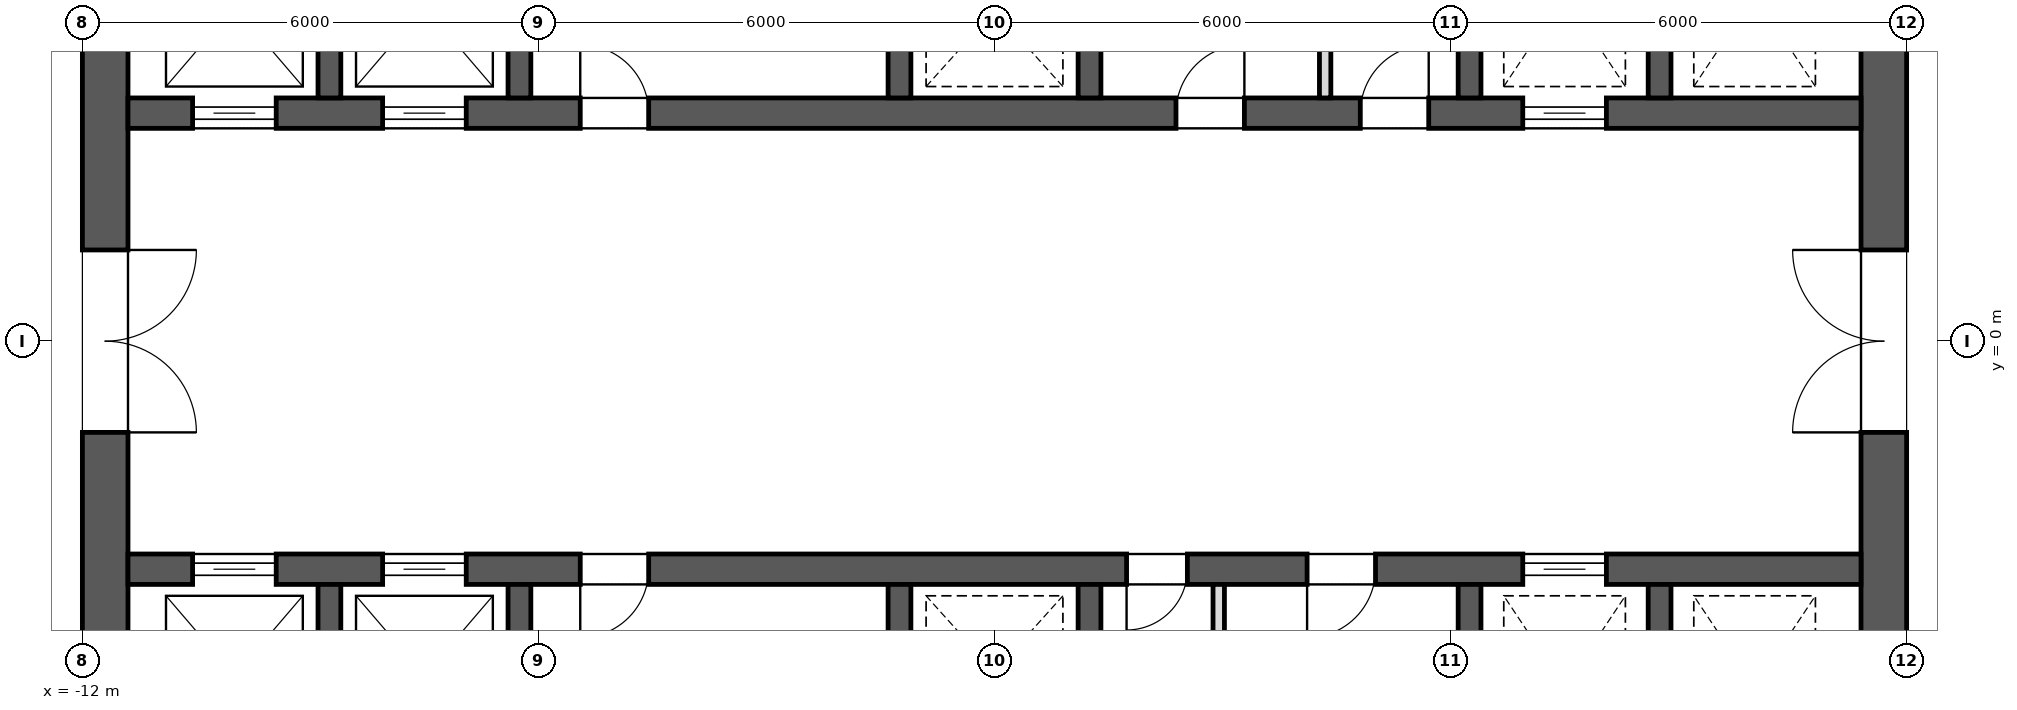
"""IFC4 building model, lengths in metres.
Left out: names, types, materials, properties, quantities, classifications, styles, units other than length and angle.
Written with IfcOpenShell. Run it as: python <this file> out.ifc"""

import sys

from ifc_helpers import new_model, si_unit, direction, frame, frame_2d, origin, place, context, subcontext, project, spatial, rectangle, extrude, element, fill, save


model = new_model("IFC4")
c1 = context("Model", 3, precision=1e-05, world=origin(), true_north=direction((0.0, 1.0)))
c2 = subcontext(c1, "Body", "Model", "MODEL_VIEW")
j1 = project(units=[si_unit("LENGTHUNIT", "METRE"), si_unit("PLANEANGLEUNIT", "RADIAN")], contexts=[c1])
p1 = place(None, origin())
s1 = spatial("IfcSite", under=j1, at=p1, CompositionType="ELEMENT")
p2 = place(p1, origin())
s2 = spatial("IfcBuilding", under=s1, at=p2, CompositionType="ELEMENT")
p3 = place(p2, frame((0.0, 0.0, 268.3)))
s3 = spatial("IfcBuildingStorey", under=s2, at=p3, CompositionType="ELEMENT", Elevation=268.3)
p4 = place(p3, frame((11.7, -11.4, 0.0), z_axis=(0.0, 0.0, 1.0), x_axis=(0.0, 1.0, 0.0)))
e1 = element("IfcWall", 1, at=p4, inside=s3, PredefinedType="SHEAR", context=c2, shape_type="SweptSolid", body=[
    extrude(rectangle(XDim=22.8, YDim=0.6, at=frame_2d((11.4, 0.0))), origin(), (0.0, 0.0, 1.0), 4.0),
])
p5 = place(p4, frame((10.2, 0.0, 0.0)))
e2 = element("IfcOpeningElement", 2, at=p5, cuts=e1, PredefinedType="OPENING", context=c2, shape_type="SweptSolid", body=[
    extrude(rectangle(XDim=2.4, YDim=2.1, at=frame_2d((1.2, 1.05))), frame((0.0, 0.312, 0.0), z_axis=(0.0, -1.0, 0.0), x_axis=(1.0, 0.0, 0.0)), (0.0, 0.0, 1.0), 0.624),
])
p6 = place(p4, frame((19.5, 0.0, 0.0)))
e3 = element("IfcOpeningElement", 3, at=p6, cuts=e1, PredefinedType="OPENING", context=c2, shape_type="SweptSolid", body=[
    extrude(rectangle(XDim=1.2, YDim=2.1, at=frame_2d((0.6, 1.05))), frame((0.0, 0.312, 0.0), z_axis=(0.0, -1.0, 0.0), x_axis=(1.0, 0.0, 0.0)), (0.0, 0.0, 1.0), 0.624),
])
p7 = place(p4, frame((2.1, 0.0, 0.0)))
e4 = element("IfcOpeningElement", 4, at=p7, cuts=e1, PredefinedType="OPENING", context=c2, shape_type="SweptSolid", body=[
    extrude(rectangle(XDim=1.2, YDim=2.1, at=frame_2d((0.6, 1.05))), frame((0.0, 0.312, 0.0), z_axis=(0.0, -1.0, 0.0), x_axis=(1.0, 0.0, 0.0)), (0.0, 0.0, 1.0), 0.624),
])
p8 = place(p3, frame((-11.7, -11.4, 0.0), z_axis=(0.0, 0.0, 1.0), x_axis=(0.0, 1.0, 0.0)))
e5 = element("IfcWall", 5, at=p8, inside=s3, PredefinedType="SHEAR", context=c2, shape_type="SweptSolid", body=[
    extrude(rectangle(XDim=22.8, YDim=0.6, at=frame_2d((11.4, 0.0))), origin(), (0.0, 0.0, 1.0), 4.0),
])
p9 = place(p8, frame((10.2, 0.0, 0.0)))
e6 = element("IfcOpeningElement", 6, at=p9, cuts=e5, PredefinedType="OPENING", context=c2, shape_type="SweptSolid", body=[
    extrude(rectangle(XDim=2.4, YDim=2.1, at=frame_2d((1.2, 1.05))), frame((0.0, 0.312, 0.0), z_axis=(0.0, -1.0, 0.0), x_axis=(1.0, 0.0, 0.0)), (0.0, 0.0, 1.0), 0.624),
])
p10 = place(p8, frame((18.925, 0.0, 0.0)))
e7 = element("IfcOpeningElement", 7, at=p10, cuts=e5, PredefinedType="OPENING", context=c2, shape_type="SweptSolid", body=[
    extrude(rectangle(XDim=1.2, YDim=2.1, at=frame_2d((0.6, 1.05))), frame((0.0, 0.312, 0.0), z_axis=(0.0, -1.0, 0.0), x_axis=(1.0, 0.0, 0.0)), (0.0, 0.0, 1.0), 0.624),
])
p11 = place(p8, frame((2.675, 0.0, 0.0)))
e8 = element("IfcOpeningElement", 8, at=p11, cuts=e5, PredefinedType="OPENING", context=c2, shape_type="SweptSolid", body=[
    extrude(rectangle(XDim=1.2, YDim=2.1, at=frame_2d((0.6, 1.05))), frame((0.0, 0.312, 0.0), z_axis=(0.0, -1.0, 0.0), x_axis=(1.0, 0.0, 0.0)), (0.0, 0.0, 1.0), 0.624),
])
p12 = place(p3, frame((-11.4, 3.0, 0.0), z_axis=(0.0, 0.0, 1.0), x_axis=(1.0, 0.0, 0.0)))
e9 = element("IfcWall", 9, at=p12, inside=s3, PredefinedType="SHEAR", context=c2, shape_type="SweptSolid", body=[
    extrude(rectangle(XDim=22.8, YDim=0.4, at=frame_2d((11.4, 0.0))), origin(), (0.0, 0.0, 1.0), 4.0),
])
p13 = place(p12, frame((0.85, 0.0, 0.0)))
e10 = element("IfcOpeningElement", 10, at=p13, cuts=e9, PredefinedType="OPENING", context=c2, shape_type="SweptSolid", body=[
    extrude(rectangle(XDim=1.1, YDim=2.1, at=frame_2d((0.55, 1.05))), frame((0.0, 0.212, 0.0), z_axis=(0.0, -1.0, 0.0), x_axis=(1.0, 0.0, 0.0)), (0.0, 0.0, 1.0), 0.424),
])
p14 = place(p12, frame((3.35, 0.0, 0.0)))
e11 = element("IfcOpeningElement", 11, at=p14, cuts=e9, PredefinedType="OPENING", context=c2, shape_type="SweptSolid", body=[
    extrude(rectangle(XDim=1.1, YDim=2.1, at=frame_2d((0.55, 1.05))), frame((0.0, 0.212, 0.0), z_axis=(0.0, -1.0, 0.0), x_axis=(1.0, 0.0, 0.0)), (0.0, 0.0, 1.0), 0.424),
])
p15 = place(p12, frame((18.35, 0.0, 0.0)))
e12 = element("IfcOpeningElement", 12, at=p15, cuts=e9, PredefinedType="OPENING", context=c2, shape_type="SweptSolid", body=[
    extrude(rectangle(XDim=1.1, YDim=2.1, at=frame_2d((0.55, 1.05))), frame((0.0, 0.212, 0.0), z_axis=(0.0, -1.0, 0.0), x_axis=(1.0, 0.0, 0.0)), (0.0, 0.0, 1.0), 0.424),
])
p16 = place(p12, frame((13.788, 0.0, 0.0)))
e13 = element("IfcOpeningElement", 13, at=p16, cuts=e9, PredefinedType="OPENING", context=c2, shape_type="SweptSolid", body=[
    extrude(rectangle(XDim=0.9, YDim=2.1, at=frame_2d((0.45, 1.05))), frame((0.0, 0.212, 0.0), z_axis=(0.0, -1.0, 0.0), x_axis=(1.0, 0.0, 0.0)), (0.0, 0.0, 1.0), 0.424),
])
p17 = place(p12, frame((16.212, 0.0, 0.0)))
e14 = element("IfcOpeningElement", 14, at=p17, cuts=e9, PredefinedType="OPENING", context=c2, shape_type="SweptSolid", body=[
    extrude(rectangle(XDim=0.9, YDim=2.1, at=frame_2d((0.45, 1.05))), frame((0.0, 0.212, 0.0), z_axis=(0.0, -1.0, 0.0), x_axis=(1.0, 0.0, 0.0)), (0.0, 0.0, 1.0), 0.424),
])
p18 = place(p12, frame((5.95, 0.0, 0.0)))
e15 = element("IfcOpeningElement", 15, at=p18, cuts=e9, PredefinedType="OPENING", context=c2, shape_type="SweptSolid", body=[
    extrude(rectangle(XDim=0.9, YDim=2.1, at=frame_2d((0.45, 1.05))), frame((0.0, 0.212, 0.0), z_axis=(0.0, -1.0, 0.0), x_axis=(1.0, 0.0, 0.0)), (0.0, 0.0, 1.0), 0.424),
])
for number, where, z_axis, x_axis in (
    (16, (-8.75, 3.2, 0.0), (0.0, 0.0, 1.0), (0.0, 1.0, 0.0)),
    (17, (-6.25, 3.2, 0.0), (0.0, 0.0, 1.0), (0.0, 1.0, 0.0)),
    (18, (-1.25, 3.2, 0.0), (0.0, 0.0, 1.0), (0.0, 1.0, 0.0)),
    (19, (1.25, 3.2, 0.0), (0.0, 0.0, 1.0), (0.0, 1.0, 0.0)),
    (20, (6.25, 3.2, 0.0), (0.0, 0.0, 1.0), (0.0, 1.0, 0.0)),
    (21, (8.75, 3.2, 0.0), (0.0, 0.0, 1.0), (0.0, 1.0, 0.0)),
):
    element("IfcWall", number, at=place(p3, frame(where, z_axis=z_axis, x_axis=x_axis)), inside=s3, PredefinedType="SHEAR", context=c2, shape_type="SweptSolid", body=[
        extrude(rectangle(XDim=2.9, YDim=0.3, at=frame_2d((1.45, 0.0))), origin(), (0.0, 0.0, 1.0), 4.0),
    ])
p19 = place(p3, frame((-11.4, -3.0, 0.0), z_axis=(0.0, 0.0, 1.0), x_axis=(1.0, 0.0, 0.0)))
e22 = element("IfcWall", 22, at=p19, inside=s3, PredefinedType="SHEAR", context=c2, shape_type="SweptSolid", body=[
    extrude(rectangle(XDim=22.8, YDim=0.4, at=frame_2d((11.4, 0.0))), origin(), (0.0, 0.0, 1.0), 4.0),
])
p20 = place(p19, frame((0.85, 0.0, 0.0)))
e23 = element("IfcOpeningElement", 23, at=p20, cuts=e22, PredefinedType="OPENING", context=c2, shape_type="SweptSolid", body=[
    extrude(rectangle(XDim=1.1, YDim=2.1, at=frame_2d((0.55, 1.05))), frame((0.0, 0.212, 0.0), z_axis=(0.0, -1.0, 0.0), x_axis=(1.0, 0.0, 0.0)), (0.0, 0.0, 1.0), 0.424),
])
p21 = place(p19, frame((3.35, 0.0, 0.0)))
e24 = element("IfcOpeningElement", 24, at=p21, cuts=e22, PredefinedType="OPENING", context=c2, shape_type="SweptSolid", body=[
    extrude(rectangle(XDim=1.1, YDim=2.1, at=frame_2d((0.55, 1.05))), frame((0.0, 0.212, 0.0), z_axis=(0.0, -1.0, 0.0), x_axis=(1.0, 0.0, 0.0)), (0.0, 0.0, 1.0), 0.424),
])
p22 = place(p19, frame((18.35, 0.0, 0.0)))
e25 = element("IfcOpeningElement", 25, at=p22, cuts=e22, PredefinedType="OPENING", context=c2, shape_type="SweptSolid", body=[
    extrude(rectangle(XDim=1.1, YDim=2.1, at=frame_2d((0.55, 1.05))), frame((0.0, 0.212, 0.0), z_axis=(0.0, -1.0, 0.0), x_axis=(1.0, 0.0, 0.0)), (0.0, 0.0, 1.0), 0.424),
])
p23 = place(p19, frame((13.137, 0.0, 0.0)))
e26 = element("IfcOpeningElement", 26, at=p23, cuts=e22, PredefinedType="OPENING", context=c2, shape_type="SweptSolid", body=[
    extrude(rectangle(XDim=0.8, YDim=2.1, at=frame_2d((0.4, 1.05))), frame((0.0, 0.212, 0.0), z_axis=(0.0, -1.0, 0.0), x_axis=(1.0, 0.0, 0.0)), (0.0, 0.0, 1.0), 0.424),
])
p24 = place(p19, frame((15.512, 0.0, 0.0)))
e27 = element("IfcOpeningElement", 27, at=p24, cuts=e22, PredefinedType="OPENING", context=c2, shape_type="SweptSolid", body=[
    extrude(rectangle(XDim=0.9, YDim=2.1, at=frame_2d((0.45, 1.05))), frame((0.0, 0.212, 0.0), z_axis=(0.0, -1.0, 0.0), x_axis=(1.0, 0.0, 0.0)), (0.0, 0.0, 1.0), 0.424),
])
p25 = place(p19, frame((5.95, 0.0, 0.0)))
e28 = element("IfcOpeningElement", 28, at=p25, cuts=e22, PredefinedType="OPENING", context=c2, shape_type="SweptSolid", body=[
    extrude(rectangle(XDim=0.9, YDim=2.1, at=frame_2d((0.45, 1.05))), frame((0.0, 0.212, 0.0), z_axis=(0.0, -1.0, 0.0), x_axis=(1.0, 0.0, 0.0)), (0.0, 0.0, 1.0), 0.424),
])
for number, where, z_axis, x_axis in (
    (29, (-8.75, -6.1, 0.0), (0.0, 0.0, 1.0), (0.0, 1.0, 0.0)),
    (30, (-6.25, -6.1, 0.0), (0.0, 0.0, 1.0), (0.0, 1.0, 0.0)),
    (31, (-1.25, -6.1, 0.0), (0.0, 0.0, 1.0), (0.0, 1.0, 0.0)),
    (32, (1.25, -6.1, 0.0), (0.0, 0.0, 1.0), (0.0, 1.0, 0.0)),
    (33, (6.25, -6.1, 0.0), (0.0, 0.0, 1.0), (0.0, 1.0, 0.0)),
    (34, (8.75, -6.1, 0.0), (0.0, 0.0, 1.0), (0.0, 1.0, 0.0)),
):
    element("IfcWall", number, at=place(p3, frame(where, z_axis=z_axis, x_axis=x_axis)), inside=s3, PredefinedType="SHEAR", context=c2, shape_type="SweptSolid", body=[
        extrude(rectangle(XDim=2.9, YDim=0.3, at=frame_2d((1.45, 0.0))), origin(), (0.0, 0.0, 1.0), 4.0),
    ])
for number, where, z_axis, x_axis in (
    (35, (4.35, 3.2, 0.0), (0.0, 0.0, 1.0), (0.0, 1.0, 0.0)),
    (36, (2.95, -6.1, 0.0), (0.0, 0.0, 1.0), (0.0, 1.0, 0.0)),
):
    element("IfcWall", number, at=place(p3, frame(where, z_axis=z_axis, x_axis=x_axis)), inside=s3, PredefinedType="PARTITIONING", context=c2, shape_type="SweptSolid", body=[
        extrude(rectangle(XDim=2.9, YDim=0.15, at=frame_2d((1.45, 0.0))), origin(), (0.0, 0.0, 1.0), 3.7),
    ])
p26 = place(p13, origin())
e37 = element("IfcDoor", 37, at=p26, inside=s3, OperationType="SLIDING_TO_LEFT", PredefinedType="DOOR", context=c2, shape_type="SweptSolid", body=[
    extrude(rectangle(XDim=1.1, YDim=2.1, at=frame_2d((0.55, 1.05))), frame((0.0, 0.025, 0.0), z_axis=(0.0, -1.0, 0.0), x_axis=(1.0, 0.0, 0.0)), (0.0, 0.0, 1.0), 0.05),
])
fill(e10, e37)
p27 = place(p14, origin())
e38 = element("IfcDoor", 38, at=p27, inside=s3, OperationType="SLIDING_TO_LEFT", PredefinedType="DOOR", context=c2, shape_type="SweptSolid", body=[
    extrude(rectangle(XDim=1.1, YDim=2.1, at=frame_2d((0.55, 1.05))), frame((0.0, 0.025, 0.0), z_axis=(0.0, -1.0, 0.0), x_axis=(1.0, 0.0, 0.0)), (0.0, 0.0, 1.0), 0.05),
])
fill(e11, e38)
p28 = place(p20, origin())
e39 = element("IfcDoor", 39, at=p28, inside=s3, OperationType="SLIDING_TO_LEFT", PredefinedType="DOOR", context=c2, shape_type="SweptSolid", body=[
    extrude(rectangle(XDim=1.1, YDim=2.1, at=frame_2d((0.55, 1.05))), frame((0.0, 0.025, 0.0), z_axis=(0.0, -1.0, 0.0), x_axis=(1.0, 0.0, 0.0)), (0.0, 0.0, 1.0), 0.05),
])
fill(e23, e39)
p29 = place(p21, origin())
e40 = element("IfcDoor", 40, at=p29, inside=s3, OperationType="SLIDING_TO_LEFT", PredefinedType="DOOR", context=c2, shape_type="SweptSolid", body=[
    extrude(rectangle(XDim=1.1, YDim=2.1, at=frame_2d((0.55, 1.05))), frame((0.0, 0.025, 0.0), z_axis=(0.0, -1.0, 0.0), x_axis=(1.0, 0.0, 0.0)), (0.0, 0.0, 1.0), 0.05),
])
fill(e24, e40)
p30 = place(p15, origin())
e41 = element("IfcDoor", 41, at=p30, inside=s3, OperationType="SLIDING_TO_LEFT", PredefinedType="DOOR", context=c2, shape_type="SweptSolid", body=[
    extrude(rectangle(XDim=1.1, YDim=2.1, at=frame_2d((0.55, 1.05))), frame((0.0, 0.025, 0.0), z_axis=(0.0, -1.0, 0.0), x_axis=(1.0, 0.0, 0.0)), (0.0, 0.0, 1.0), 0.05),
])
fill(e12, e41)
p31 = place(p22, origin())
e42 = element("IfcDoor", 42, at=p31, inside=s3, OperationType="SLIDING_TO_LEFT", PredefinedType="DOOR", context=c2, shape_type="SweptSolid", body=[
    extrude(rectangle(XDim=1.1, YDim=2.1, at=frame_2d((0.55, 1.05))), frame((0.0, 0.025, 0.0), z_axis=(0.0, -1.0, 0.0), x_axis=(1.0, 0.0, 0.0)), (0.0, 0.0, 1.0), 0.05),
])
fill(e25, e42)
p32 = place(p9, frame((2.4, 0.0, 0.0), z_axis=(0.0, 0.0, 1.0), x_axis=(-1.0, 0.0, 0.0)))
e43 = element("IfcDoor", 43, at=p32, inside=s3, OperationType="DOUBLE_DOOR_SINGLE_SWING", PredefinedType="DOOR", context=c2, shape_type="SweptSolid", body=[
    extrude(rectangle(XDim=2.4, YDim=2.1, at=frame_2d((1.2, 1.05))), frame((0.0, 0.025, 0.0), z_axis=(0.0, -1.0, 0.0), x_axis=(1.0, 0.0, 0.0)), (0.0, 0.0, 1.0), 0.05),
])
fill(e6, e43)
p33 = place(p5, origin())
e44 = element("IfcDoor", 44, at=p33, inside=s3, OperationType="DOUBLE_DOOR_SINGLE_SWING", PredefinedType="DOOR", context=c2, shape_type="SweptSolid", body=[
    extrude(rectangle(XDim=2.4, YDim=2.1, at=frame_2d((1.2, 1.05))), frame((0.0, 0.025, 0.0), z_axis=(0.0, -1.0, 0.0), x_axis=(1.0, 0.0, 0.0)), (0.0, 0.0, 1.0), 0.05),
])
fill(e2, e44)
p34 = place(p16, origin())
e45 = element("IfcDoor", 45, at=p34, inside=s3, OperationType="SINGLE_SWING_LEFT", PredefinedType="DOOR", context=c2, shape_type="SweptSolid", body=[
    extrude(rectangle(XDim=0.9, YDim=2.1, at=frame_2d((0.45, 1.05))), frame((0.0, 0.025, 0.0), z_axis=(0.0, -1.0, 0.0), x_axis=(1.0, 0.0, 0.0)), (0.0, 0.0, 1.0), 0.05),
])
fill(e13, e45)
p35 = place(p17, origin())
e46 = element("IfcDoor", 46, at=p35, inside=s3, OperationType="SINGLE_SWING_LEFT", PredefinedType="DOOR", context=c2, shape_type="SweptSolid", body=[
    extrude(rectangle(XDim=0.9, YDim=2.1, at=frame_2d((0.45, 1.05))), frame((0.0, 0.025, 0.0), z_axis=(0.0, -1.0, 0.0), x_axis=(1.0, 0.0, 0.0)), (0.0, 0.0, 1.0), 0.05),
])
fill(e14, e46)
p36 = place(p18, origin())
e47 = element("IfcDoor", 47, at=p36, inside=s3, OperationType="SINGLE_SWING_RIGHT", PredefinedType="DOOR", context=c2, shape_type="SweptSolid", body=[
    extrude(rectangle(XDim=0.9, YDim=2.1, at=frame_2d((0.45, 1.05))), frame((0.0, 0.025, 0.0), z_axis=(0.0, -1.0, 0.0), x_axis=(1.0, 0.0, 0.0)), (0.0, 0.0, 1.0), 0.05),
])
fill(e15, e47)
p37 = place(p23, frame((0.8, 0.0, 0.0), z_axis=(0.0, 0.0, 1.0), x_axis=(-1.0, 0.0, 0.0)))
e48 = element("IfcDoor", 48, at=p37, inside=s3, OperationType="SINGLE_SWING_LEFT", PredefinedType="DOOR", context=c2, shape_type="SweptSolid", body=[
    extrude(rectangle(XDim=0.8, YDim=2.1, at=frame_2d((0.4, 1.05))), frame((0.0, 0.025, 0.0), z_axis=(0.0, -1.0, 0.0), x_axis=(1.0, 0.0, 0.0)), (0.0, 0.0, 1.0), 0.05),
])
fill(e26, e48)
p38 = place(p24, frame((0.9, 0.0, 0.0), z_axis=(0.0, 0.0, 1.0), x_axis=(-1.0, 0.0, 0.0)))
e49 = element("IfcDoor", 49, at=p38, inside=s3, OperationType="SINGLE_SWING_LEFT", PredefinedType="DOOR", context=c2, shape_type="SweptSolid", body=[
    extrude(rectangle(XDim=0.9, YDim=2.1, at=frame_2d((0.45, 1.05))), frame((0.0, 0.025, 0.0), z_axis=(0.0, -1.0, 0.0), x_axis=(1.0, 0.0, 0.0)), (0.0, 0.0, 1.0), 0.05),
])
fill(e27, e49)
p39 = place(p25, frame((0.9, 0.0, 0.0), z_axis=(0.0, 0.0, 1.0), x_axis=(-1.0, 0.0, 0.0)))
e50 = element("IfcDoor", 50, at=p39, inside=s3, OperationType="SINGLE_SWING_LEFT", PredefinedType="DOOR", context=c2, shape_type="SweptSolid", body=[
    extrude(rectangle(XDim=0.9, YDim=2.1, at=frame_2d((0.45, 1.05))), frame((0.0, 0.025, 0.0), z_axis=(0.0, -1.0, 0.0), x_axis=(1.0, 0.0, 0.0)), (0.0, 0.0, 1.0), 0.05),
])
fill(e28, e50)
save(model, sys.argv[1])
